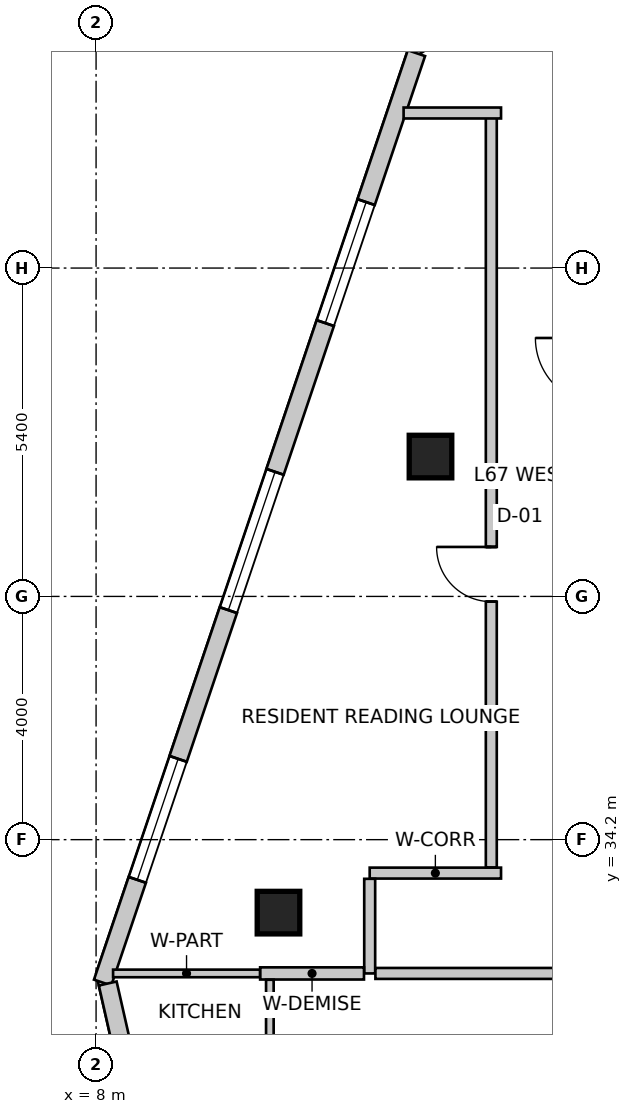
"""IFC4 building model, lengths in metres.
Left out: names, types, materials, properties, quantities, classifications, styles, units other than length and angle.
Written with IfcOpenShell. Run it as: python <this file> out.ifc"""

import sys

from ifc_helpers import new_model, si_unit, direction, frame, frame_2d, origin, origin_2d, place, context, subcontext, project, spatial, rectangle, extrude, source, transform, mapped, element, fill, save


model = new_model("IFC4")
c1 = context("Model", 3, precision=1e-05, world=origin(), true_north=direction((0.0, 1.0)))
c2 = subcontext(c1, "Body", "Model", "MODEL_VIEW")
j1 = project(units=[si_unit("LENGTHUNIT", "METRE"), si_unit("PLANEANGLEUNIT", "RADIAN")], contexts=[c1])
p1 = place(None, origin())
s1 = spatial("IfcSite", under=j1, at=p1, CompositionType="ELEMENT")
p2 = place(p1, origin())
s2 = spatial("IfcBuilding", under=s1, at=p2, CompositionType="ELEMENT")
p3 = place(p2, frame((0.0, 0.0, 263.7)))
s3 = spatial("IfcBuildingStorey", under=s2, at=p3, CompositionType="ELEMENT", Elevation=263.7)
m1 = source(origin(), c2, "Body", "SweptSolid", [
    extrude(rectangle(XDim=0.7, YDim=0.7, at=origin_2d()), origin(), (0.0, 0.0, 1.0), 3.6),
])
for number, where, z_axis, x_axis in (
    (1, (11.0, 33.0, 0.0), (0.0, 0.0, 1.0), (1.0, 0.0, 0.0)),
    (2, (13.5, 40.5, 0.0), (0.0, 0.0, 1.0), (1.0, 0.0, 0.0)),
):
    element("IfcColumn", number, at=place(p3, frame(where, z_axis=z_axis, x_axis=x_axis)), inside=s3, PredefinedType="COLUMN", context=c2, shape_type="MappedRepresentation", body=[
        mapped(m1, transform((0.0, 0.0, 0.0), scale=1.0)),
    ])
p4 = place(p3, frame((21.874, 52.742, 0.0), z_axis=(0.0, 0.0, 1.0), x_axis=(-0.84365659959, -0.536883173482, 0.0)))
e3 = element("IfcWall", 3, at=p4, inside=s3, PredefinedType="SOLIDWALL", context=c2, shape_type="SweptSolid", body=[
    extrude(rectangle(XDim=10.283, YDim=0.3, at=frame_2d((5.142, 0.0))), origin(), (0.0, 0.0, 1.0), 3.35),
])
m2 = source(origin(), c2, "Body", "SweptSolid", [
    extrude(rectangle(XDim=2.4, YDim=2.2, at=frame_2d((1.2, 1.1))), frame((0.0, 0.16, 0.0), z_axis=(0.0, -1.0, 0.0), x_axis=(1.0, 0.0, 0.0)), (0.0, 0.0, 1.0), 0.32),
])
p5 = place(p4, frame((1.26, 0.0, 0.85)))
e4 = element("IfcOpeningElement", 4, at=p5, cuts=e3, PredefinedType="OPENING", context=c2, shape_type="MappedRepresentation", body=[
    mapped(m2, transform((0.0, 0.0, 0.0), scale=1.0)),
])
m3 = source(origin(), c2, "Body", "SweptSolid", [
    extrude(rectangle(XDim=2.1, YDim=2.0, at=frame_2d((1.05, 1.0))), frame((0.0, 0.16, 0.0), z_axis=(0.0, -1.0, 0.0), x_axis=(1.0, 0.0, 0.0)), (0.0, 0.0, 1.0), 0.32),
])
p6 = place(p4, frame((5.69, 0.0, 0.85)))
e5 = element("IfcOpeningElement", 5, at=p6, cuts=e3, PredefinedType="OPENING", context=c2, shape_type="MappedRepresentation", body=[
    mapped(m3, transform((0.0, 0.0, 0.0), scale=1.0)),
])
p7 = place(p3, frame((13.269, 47.134, 0.0), z_axis=(0.0, 0.0, 1.0), x_axis=(-0.3199211297, -0.947444178182, 0.0)))
e6 = element("IfcWall", 6, at=p7, inside=s3, PredefinedType="SOLIDWALL", context=c2, shape_type="SweptSolid", body=[
    extrude(rectangle(XDim=16.132, YDim=0.3, at=frame_2d((8.066, 0.0))), origin(), (0.0, 0.0, 1.0), 3.35),
])
p8 = place(p7, frame((2.585, 0.0, 0.85)))
e7 = element("IfcOpeningElement", 7, at=p8, cuts=e6, PredefinedType="OPENING", context=c2, shape_type="MappedRepresentation", body=[
    mapped(m3, transform((0.0, 0.0, 0.0), scale=1.0)),
])
p9 = place(p7, frame((7.267, 0.0, 0.85)))
e8 = element("IfcOpeningElement", 8, at=p9, cuts=e6, PredefinedType="OPENING", context=c2, shape_type="MappedRepresentation", body=[
    mapped(m2, transform((0.0, 0.0, 0.0), scale=1.0)),
])
p10 = place(p7, frame((12.249, 0.0, 0.85)))
e9 = element("IfcOpeningElement", 9, at=p10, cuts=e6, PredefinedType="OPENING", context=c2, shape_type="MappedRepresentation", body=[
    mapped(m3, transform((0.0, 0.0, 0.0), scale=1.0)),
])
p11 = place(p3, frame((8.191, 31.834, 0.0), z_axis=(0.0, 0.0, 1.0), x_axis=(0.221636032737, -0.975129462683, 0.0)))
e10 = element("IfcWall", 10, at=p11, inside=s3, PredefinedType="SOLIDWALL", context=c2, shape_type="SweptSolid", body=[
    extrude(rectangle(XDim=10.602, YDim=0.3, at=frame_2d((5.301, 0.0))), origin(), (0.0, 0.0, 1.0), 3.35),
])
p12 = place(p11, frame((2.351, 0.0, 0.85)))
e11 = element("IfcOpeningElement", 11, at=p12, cuts=e10, PredefinedType="OPENING", context=c2, shape_type="MappedRepresentation", body=[
    mapped(m2, transform((0.0, 0.0, 0.0), scale=1.0)),
])
p13 = place(p11, frame((7.552, 0.0, 0.85)))
e12 = element("IfcOpeningElement", 12, at=p13, cuts=e10, PredefinedType="OPENING", context=c2, shape_type="MappedRepresentation", body=[
    mapped(m2, transform((0.0, 0.0, 0.0), scale=1.0)),
])
p14 = place(p3, frame((12.5, 33.65, 0.0), z_axis=(0.0, 0.0, 1.0), x_axis=(1.0, 0.0, 0.0)))
e13 = element("IfcWall", 13, at=p14, inside=s3, PredefinedType="PARTITIONING", context=c2, shape_type="SweptSolid", body=[
    extrude(rectangle(XDim=2.16, YDim=0.18, at=frame_2d((1.08, 0.0))), origin(), (0.0, 0.0, 1.0), 3.35),
])
p15 = place(p3, frame((12.5, 32.0, 0.0), z_axis=(0.0, 0.0, 1.0), x_axis=(0.0, 1.0, 0.0)))
e14 = element("IfcWall", 14, at=p15, inside=s3, PredefinedType="PARTITIONING", context=c2, shape_type="SweptSolid", body=[
    extrude(rectangle(XDim=1.556, YDim=0.18, at=frame_2d((0.778, 0.0))), origin(), (0.0, 0.0, 1.0), 3.019),
])
p16 = place(p3, frame((18.36, 32.0, 0.0), z_axis=(0.0, 0.0, 1.0), x_axis=(-1.0, 0.0, 0.0)))
e15 = element("IfcWall", 15, at=p16, inside=s3, PredefinedType="PARTITIONING", context=c2, shape_type="SweptSolid", body=[
    extrude(rectangle(XDim=5.766, YDim=0.18, at=frame_2d((2.883, 0.0))), origin(), (0.0, 0.0, 1.0), 3.019),
])
p17 = place(p3, frame((14.5, 33.744, 0.0), z_axis=(0.0, 0.0, 1.0), x_axis=(0.0, 1.0, 0.0)))
e16 = element("IfcWall", 16, at=p17, inside=s3, PredefinedType="PARTITIONING", context=c2, shape_type="SweptSolid", body=[
    extrude(rectangle(XDim=12.406, YDim=0.18, at=frame_2d((6.203, 0.0))), origin(), (0.0, 0.0, 1.0), 3.35),
])
m4 = source(origin(), c2, "Body", "SweptSolid", [
    extrude(rectangle(XDim=0.9, YDim=2.15, at=frame_2d((0.45, 1.075))), frame((0.0, 0.1, 0.0), z_axis=(0.0, -1.0, 0.0), x_axis=(1.0, 0.0, 0.0)), (0.0, 0.0, 1.0), 0.2),
])
p18 = place(p17, frame((4.37, 0.0, 0.0)))
e17 = element("IfcOpeningElement", 17, at=p18, cuts=e16, PredefinedType="OPENING", context=c2, shape_type="MappedRepresentation", body=[
    mapped(m4, transform((0.0, 0.0, 0.0), scale=1.0)),
])
p19 = place(p3, frame((14.66, 46.15, 0.0), z_axis=(0.0, 0.0, 1.0), x_axis=(-1.0, 0.0, 0.0)))
e18 = element("IfcWall", 18, at=p19, inside=s3, PredefinedType="PARTITIONING", context=c2, shape_type="SweptSolid", body=[
    extrude(rectangle(XDim=1.602, YDim=0.18, at=frame_2d((0.801, 0.0))), origin(), (0.0, 0.0, 1.0), 3.35),
])
p20 = place(p3, frame((12.406, 32.0, 0.0), z_axis=(0.0, 0.0, 1.0), x_axis=(-1.0, 0.0, 0.0)))
e19 = element("IfcWall", 19, at=p20, inside=s3, PredefinedType="PARTITIONING", context=c2, shape_type="SweptSolid", body=[
    extrude(rectangle(XDim=1.708, YDim=0.2, at=frame_2d((0.854, 0.0))), origin(), (0.0, 0.0, 1.0), 2.642),
])
p21 = place(p3, frame((10.696, 32.0, 0.0), z_axis=(0.0, 0.0, 1.0), x_axis=(-1.0, 0.0, 0.0)))
e20 = element("IfcWall", 20, at=p21, inside=s3, PredefinedType="PARTITIONING", context=c2, shape_type="SweptSolid", body=[
    extrude(rectangle(XDim=2.416, YDim=0.125, at=frame_2d((1.208, 0.0))), origin(), (0.0, 0.0, 1.0), 3.35),
])
p22 = place(p3, frame((10.858, 25.032, 0.0), z_axis=(0.0, 0.0, 1.0), x_axis=(0.0, 1.0, 0.0)))
e21 = element("IfcWall", 21, at=p22, inside=s3, PredefinedType="PARTITIONING", context=c2, shape_type="SweptSolid", body=[
    extrude(rectangle(XDim=6.864, YDim=0.125, at=frame_2d((3.432, 0.0))), origin(), (0.0, 0.0, 1.0), 2.642),
])
m5 = source(origin(), c2, "Body", "SweptSolid", [
    extrude(rectangle(XDim=0.85, YDim=2.15, at=frame_2d((0.425, 1.075))), frame((0.0, 0.073, 0.0), z_axis=(0.0, -1.0, 0.0), x_axis=(1.0, 0.0, 0.0)), (0.0, 0.0, 1.0), 0.145),
])
p23 = place(p22, frame((0.886, 0.0, 0.0)))
e22 = element("IfcOpeningElement", 22, at=p23, cuts=e21, PredefinedType="OPENING", context=c2, shape_type="MappedRepresentation", body=[
    mapped(m5, transform((0.0, 0.0, 0.0), scale=1.0)),
])
m6 = source(origin(), c2, "Body", "SweptSolid", [
    extrude(rectangle(XDim=2.1, YDim=2.0, at=frame_2d((1.05, 1.0))), frame((0.0, -0.015, 0.0), z_axis=(0.0, -1.0, 0.0), x_axis=(1.0, 0.0, 0.0)), (0.0, 0.0, 1.0), 0.06),
])
p24 = place(p8, origin())
e23 = element("IfcWindow", 23, at=p24, inside=s3, PartitioningType="SINGLE_PANEL", PredefinedType="WINDOW", context=c2, shape_type="MappedRepresentation", body=[
    mapped(m6, transform((0.0, 0.0, 0.0), scale=1.0)),
])
fill(e7, e23)
m7 = source(origin(), c2, "Body", "SweptSolid", [
    extrude(rectangle(XDim=2.4, YDim=2.2, at=frame_2d((1.2, 1.1))), frame((0.0, -0.015, 0.0), z_axis=(0.0, -1.0, 0.0), x_axis=(1.0, 0.0, 0.0)), (0.0, 0.0, 1.0), 0.06),
])
p25 = place(p9, origin())
e24 = element("IfcWindow", 24, at=p25, inside=s3, PartitioningType="SINGLE_PANEL", PredefinedType="WINDOW", context=c2, shape_type="MappedRepresentation", body=[
    mapped(m7, transform((0.0, 0.0, 0.0), scale=1.0)),
])
fill(e8, e24)
p26 = place(p10, origin())
e25 = element("IfcWindow", 25, at=p26, inside=s3, PartitioningType="SINGLE_PANEL", PredefinedType="WINDOW", context=c2, shape_type="MappedRepresentation", body=[
    mapped(m6, transform((0.0, 0.0, 0.0), scale=1.0)),
])
fill(e9, e25)
m8 = source(origin(), c2, "Body", "SweptSolid", [
    extrude(rectangle(XDim=0.9, YDim=2.15, at=frame_2d((0.45, 1.075))), frame((0.0, 0.025, 0.0), z_axis=(0.0, -1.0, 0.0), x_axis=(1.0, 0.0, 0.0)), (0.0, 0.0, 1.0), 0.05),
])
p27 = place(p18, origin())
e26 = element("IfcDoor", 26, at=p27, inside=s3, OperationType="SINGLE_SWING_RIGHT", PredefinedType="DOOR", context=c2, shape_type="MappedRepresentation", body=[
    mapped(m8, transform((0.0, 0.0, 0.0), scale=1.0)),
])
fill(e17, e26)
save(model, sys.argv[1])
